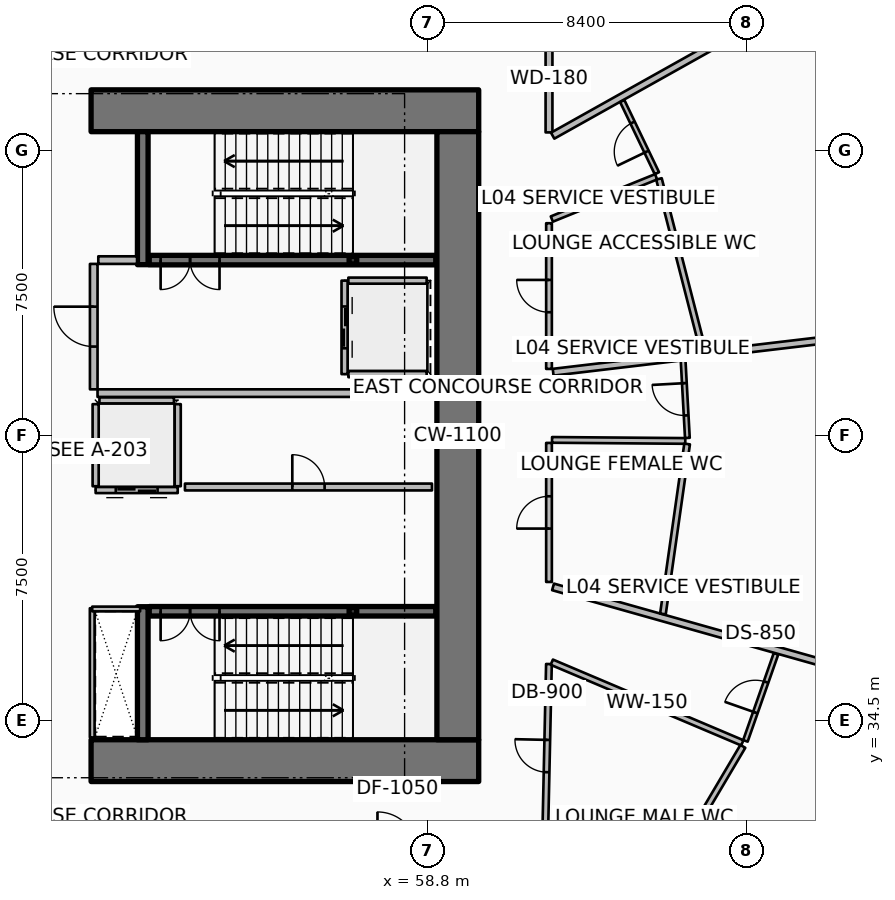
"""IFC4 building model, lengths in metres.
Left out: names, types, materials, properties, quantities, classifications, styles, units other than length and angle.
Written with IfcOpenShell. Run it as: python <this file> out.ifc"""

import sys

from ifc_helpers import new_model, si_unit, direction, frame, frame_2d, origin, origin_2d, place, context, subcontext, project, spatial, rectangle, hollow_rectangle, extrude, element, fill, save


model = new_model("IFC4")
c1 = context("Model", 3, precision=1e-05, world=origin(), true_north=direction((0.0, 1.0)))
c2 = subcontext(c1, "Body", "Model", "MODEL_VIEW")
j1 = project(units=[si_unit("LENGTHUNIT", "METRE"), si_unit("PLANEANGLEUNIT", "RADIAN")], contexts=[c1])
p1 = place(None, origin())
s1 = spatial("IfcSite", under=j1, at=p1, CompositionType="ELEMENT")
p2 = place(p1, origin())
s2 = spatial("IfcBuilding", under=s1, at=p2, CompositionType="ELEMENT")
p3 = place(p2, frame((0.0, 0.0, 21.6)))
s3 = spatial("IfcBuildingStorey", under=s2, at=p3, CompositionType="ELEMENT", Elevation=21.6)
for number, where, z_axis, x_axis in (
    (1, (49.95, 33.45, 0.0), (0.0, 0.0, 1.0), (1.0, 0.0, 0.0)),
    (2, (49.95, 50.55, 0.0), (0.0, 0.0, 1.0), (1.0, 0.0, 0.0)),
):
    element("IfcWall", number, at=place(p3, frame(where, z_axis=z_axis, x_axis=x_axis)), inside=s3, PredefinedType="SHEAR", context=c2, shape_type="SweptSolid", body=[
        extrude(rectangle(XDim=10.2, YDim=1.1, at=frame_2d((5.1, 0.0))), origin(), (0.0, 0.0, 1.0), 4.8),
    ])
p4 = place(p3, frame((59.6, 34.0, 0.0), z_axis=(0.0, 0.0, 1.0), x_axis=(0.0, 1.0, 0.0)))
e3 = element("IfcWall", 3, at=p4, inside=s3, PredefinedType="SHEAR", context=c2, shape_type="SweptSolid", body=[
    extrude(rectangle(XDim=16.0, YDim=1.1, at=frame_2d((8.0, 0.0))), origin(), (0.0, 0.0, 1.0), 4.8),
])
for number, where, z_axis, x_axis in (
    (4, (51.31, 46.5, 0.0), (0.0, 0.0, 1.0), (0.0, 1.0, 0.0)),
    (5, (51.31, 34.0, 0.0), (0.0, 0.0, 1.0), (0.0, 1.0, 0.0)),
):
    element("IfcWall", number, at=place(p3, frame(where, z_axis=z_axis, x_axis=x_axis)), inside=s3, PredefinedType="SHEAR", context=c2, shape_type="SweptSolid", body=[
        extrude(rectangle(XDim=3.5, YDim=0.28, at=frame_2d((1.75, 0.0))), origin(), (0.0, 0.0, 1.0), 4.8),
    ])
for number, where, z_axis, x_axis in (
    (6, (56.84, 46.62, 0.0), (0.0, 0.0, 1.0), (1.0, 0.0, 0.0)),
    (7, (56.84, 37.38, 0.0), (0.0, 0.0, 1.0), (1.0, 0.0, 0.0)),
):
    element("IfcColumn", number, at=place(p3, frame(where, z_axis=z_axis, x_axis=x_axis)), inside=s3, PredefinedType="COLUMN", context=c2, shape_type="SweptSolid", body=[
        extrude(hollow_rectangle(XDim=0.2, YDim=0.2, WallThickness=0.01, InnerFilletRadius=0.01, OuterFilletRadius=0.02, at=origin_2d()), origin(), (0.0, 0.0, 1.0), 2.195),
    ])
p5 = place(p3, frame((51.48, 46.62, 0.0), z_axis=(0.0, 0.0, 1.0), x_axis=(1.0, 0.0, 0.0)))
e8 = element("IfcWall", 8, at=p5, inside=s3, PredefinedType="SOLIDWALL", context=c2, shape_type="SweptSolid", body=[
    extrude(rectangle(XDim=7.54, YDim=0.25, at=frame_2d((3.77, 0.0))), origin(), (0.0, 0.0, 1.0), 4.4),
])
p6 = place(p5, frame((0.3, 0.0, 0.0)))
e9 = element("IfcOpeningElement", 9, at=p6, cuts=e8, PredefinedType="OPENING", context=c2, shape_type="SweptSolid", body=[
    extrude(rectangle(XDim=1.55, YDim=2.15, at=frame_2d((0.775, 1.075))), frame((0.0, 0.135, 0.0), z_axis=(0.0, -1.0, 0.0), x_axis=(1.0, 0.0, 0.0)), (0.0, 0.0, 1.0), 0.27),
])
p7 = place(p3, frame((51.48, 37.38, 0.0), z_axis=(0.0, 0.0, 1.0), x_axis=(1.0, 0.0, 0.0)))
e10 = element("IfcWall", 10, at=p7, inside=s3, PredefinedType="SOLIDWALL", context=c2, shape_type="SweptSolid", body=[
    extrude(rectangle(XDim=7.54, YDim=0.25, at=frame_2d((3.77, 0.0))), origin(), (0.0, 0.0, 1.0), 4.4),
])
p8 = place(p7, frame((0.3, 0.0, 0.0)))
e11 = element("IfcOpeningElement", 11, at=p8, cuts=e10, PredefinedType="OPENING", context=c2, shape_type="SweptSolid", body=[
    extrude(rectangle(XDim=1.55, YDim=2.15, at=frame_2d((0.775, 1.075))), frame((0.0, 0.135, 0.0), z_axis=(0.0, -1.0, 0.0), x_axis=(1.0, 0.0, 0.0)), (0.0, 0.0, 1.0), 0.27),
])
p9 = place(p3, frame((56.62, 46.08, 0.0), z_axis=(0.0, 0.0, 1.0), x_axis=(0.0, -1.0, 0.0)))
e12 = element("IfcWall", 12, at=p9, inside=s3, PredefinedType="PARTITIONING", context=c2, shape_type="SweptSolid", body=[
    extrude(rectangle(XDim=2.46, YDim=0.16, at=frame_2d((1.23, 0.0))), origin(), (0.0, 0.0, 1.0), 4.4),
])
p10 = place(p9, frame((0.68, 0.0, 0.0)))
e13 = element("IfcOpeningElement", 13, at=p10, cuts=e12, PredefinedType="OPENING", context=c2, shape_type="SweptSolid", body=[
    extrude(rectangle(XDim=1.1, YDim=2.1, at=frame_2d((0.55, 1.05))), frame((0.0, 0.09, 0.0), z_axis=(0.0, -1.0, 0.0), x_axis=(1.0, 0.0, 0.0)), (0.0, 0.0, 1.0), 0.18),
])
for number, where, z_axis, x_axis in (
    (14, (56.72, 46.08, 0.0), (0.0, 0.0, 1.0), (1.0, 0.0, 0.0)),
    (15, (56.72, 43.62, 0.0), (0.0, 0.0, 1.0), (1.0, 0.0, 0.0)),
):
    element("IfcWall", number, at=place(p3, frame(where, z_axis=z_axis, x_axis=x_axis)), inside=s3, PredefinedType="PARTITIONING", context=c2, shape_type="SweptSolid", body=[
        extrude(rectangle(XDim=2.06, YDim=0.16, at=frame_2d((1.03, 0.0))), origin(), (0.0, 0.0, 1.0), 4.4),
    ])
p11 = place(p3, frame((52.23, 40.57, 0.0), z_axis=(0.0, 0.0, 1.0), x_axis=(-1.0, 0.0, 0.0)))
e16 = element("IfcWall", 16, at=p11, inside=s3, PredefinedType="PARTITIONING", context=c2, shape_type="SweptSolid", body=[
    extrude(rectangle(XDim=2.16, YDim=0.16, at=frame_2d((1.08, 0.0))), origin(), (0.0, 0.0, 1.0), 4.4),
])
p12 = place(p11, frame((0.53, 0.0, 0.0)))
e17 = element("IfcOpeningElement", 17, at=p12, cuts=e16, PredefinedType="OPENING", context=c2, shape_type="SweptSolid", body=[
    extrude(rectangle(XDim=1.1, YDim=2.1, at=frame_2d((0.55, 1.05))), frame((0.0, 0.09, 0.0), z_axis=(0.0, -1.0, 0.0), x_axis=(1.0, 0.0, 0.0)), (0.0, 0.0, 1.0), 0.18),
])
for number, where, z_axis, x_axis in (
    (18, (52.23, 40.67, 0.0), (0.0, 0.0, 1.0), (0.0, 1.0, 0.0)),
    (19, (50.07, 40.67, 0.0), (0.0, 0.0, 1.0), (0.0, 1.0, 0.0)),
):
    element("IfcWall", number, at=place(p3, frame(where, z_axis=z_axis, x_axis=x_axis)), inside=s3, PredefinedType="PARTITIONING", context=c2, shape_type="SweptSolid", body=[
        extrude(rectangle(XDim=2.16, YDim=0.16, at=frame_2d((1.08, 0.0))), origin(), (0.0, 0.0, 1.0), 4.4),
    ])
p13 = place(p3, frame((50.17, 42.93, 0.0), z_axis=(0.0, 0.0, 1.0), x_axis=(1.0, 0.0, 0.0)))
e20 = element("IfcWall", 20, at=p13, inside=s3, PredefinedType="PARTITIONING", context=c2, shape_type="SweptSolid", body=[
    extrude(rectangle(XDim=1.96, YDim=0.16, at=frame_2d((0.98, 0.0))), origin(), (0.0, 0.0, 1.0), 4.4),
])
p14 = place(p3, frame((52.42, 40.65, 0.0), z_axis=(0.0, 0.0, 1.0), x_axis=(1.0, 0.0, 0.0)))
e21 = element("IfcWall", 21, at=p14, inside=s3, PredefinedType="PARTITIONING", context=c2, shape_type="SweptSolid", body=[
    extrude(rectangle(XDim=6.5, YDim=0.18, at=frame_2d((3.25, 0.0))), origin(), (0.0, 0.0, 1.0), 4.4),
])
p15 = place(p14, frame((2.825, 0.0, 0.0)))
e22 = element("IfcOpeningElement", 22, at=p15, cuts=e21, PredefinedType="OPENING", context=c2, shape_type="SweptSolid", body=[
    extrude(rectangle(XDim=0.85, YDim=2.06, at=frame_2d((0.425, 1.03))), frame((0.0, 0.1, 0.0), z_axis=(0.0, -1.0, 0.0), x_axis=(1.0, 0.0, 0.0)), (0.0, 0.0, 1.0), 0.2),
])
p16 = place(p3, frame((50.12, 43.12, 0.0), z_axis=(0.0, 0.0, 1.0), x_axis=(1.0, 0.0, 0.0)))
e23 = element("IfcWall", 23, at=p16, inside=s3, PredefinedType="PARTITIONING", context=c2, shape_type="SweptSolid", body=[
    extrude(rectangle(XDim=8.88, YDim=0.2, at=frame_2d((4.44, 0.0))), origin(), (0.0, 0.0, 1.0), 4.4),
])
p17 = place(p3, frame((50.14, 46.62, 0.0), z_axis=(0.0, 0.0, 1.0), x_axis=(1.0, 0.0, 0.0)))
e24 = element("IfcWall", 24, at=p17, inside=s3, PredefinedType="PARTITIONING", context=c2, shape_type="SweptSolid", body=[
    extrude(rectangle(XDim=1.02, YDim=0.2, at=frame_2d((0.51, 0.0))), origin(), (0.0, 0.0, 1.0), 4.4),
])
p18 = place(p3, frame((50.02, 43.22, 0.0), z_axis=(0.0, 0.0, 1.0), x_axis=(0.0, 1.0, 0.0)))
e25 = element("IfcWall", 25, at=p18, inside=s3, PredefinedType="PARTITIONING", context=c2, shape_type="SweptSolid", body=[
    extrude(rectangle(XDim=3.3, YDim=0.2, at=frame_2d((1.65, 0.0))), origin(), (0.0, 0.0, 1.0), 4.4),
])
p19 = place(p18, frame((1.125, 0.0, 0.0)))
e26 = element("IfcOpeningElement", 26, at=p19, cuts=e25, PredefinedType="OPENING", context=c2, shape_type="SweptSolid", body=[
    extrude(rectangle(XDim=1.05, YDim=2.1, at=frame_2d((0.525, 1.05))), frame((0.0, 0.11, 0.0), z_axis=(0.0, -1.0, 0.0), x_axis=(1.0, 0.0, 0.0)), (0.0, 0.0, 1.0), 0.22),
])
p20 = place(p3, frame((49.98, 34.06, 0.0), z_axis=(0.0, 0.0, 1.0), x_axis=(0.0, 1.0, 0.0)))
e27 = element("IfcWall", 27, at=p20, inside=s3, PredefinedType="PARTITIONING", context=c2, shape_type="SweptSolid", body=[
    extrude(rectangle(XDim=3.4, YDim=0.125, at=frame_2d((1.7, 0.0))), origin(), (0.0, 0.0, 1.0), 3.84),
])
p21 = place(p3, frame((49.98, 37.44, 0.0), z_axis=(0.0, 0.0, 1.0), x_axis=(1.0, 0.0, 0.0)))
e28 = element("IfcWall", 28, at=p21, inside=s3, PredefinedType="PARTITIONING", context=c2, shape_type="SweptSolid", body=[
    extrude(rectangle(XDim=1.26, YDim=0.125, at=frame_2d((0.63, 0.0))), origin(), (0.0, 0.0, 1.0), 3.84),
])
p22 = place(p3, frame((62.0, 49.98, 0.0), z_axis=(0.0, 0.0, 1.0), x_axis=(0.0, 1.0, 0.0)))
e29 = element("IfcWall", 29, at=p22, inside=s3, PredefinedType="PARTITIONING", context=c2, shape_type="SweptSolid", body=[
    extrude(rectangle(XDim=2.83, YDim=0.18, at=frame_2d((1.415, 0.0))), origin(), (0.0, 0.0, 1.0), 3.357),
])
p23 = place(p3, frame((62.096, 49.894, 0.0), z_axis=(0.0, 0.0, 1.0), x_axis=(0.872490608205, 0.488630881744, 0.0)))
e30 = element("IfcWall", 30, at=p23, inside=s3, PredefinedType="PARTITIONING", context=c2, shape_type="SweptSolid", body=[
    extrude(rectangle(XDim=19.185, YDim=0.18, at=frame_2d((9.592, 0.0))), origin(), (0.0, 0.0, 1.0), 3.357),
])
p24 = place(p3, frame((61.892, 31.15, 0.0), z_axis=(0.0, 0.0, 1.0), x_axis=(0.021928973177, 0.999759531155, 0.0)))
e31 = element("IfcWall", 31, at=p24, inside=s3, PredefinedType="PARTITIONING", context=c2, shape_type="SweptSolid", body=[
    extrude(rectangle(XDim=4.843, YDim=0.15, at=frame_2d((2.421, 0.0))), origin(), (0.0, 0.0, 1.0), 3.357),
])
p25 = place(p24, frame((1.997, 0.0, 0.0)))
e32 = element("IfcOpeningElement", 32, at=p25, cuts=e31, PredefinedType="OPENING", context=c2, shape_type="SweptSolid", body=[
    extrude(rectangle(XDim=0.85, YDim=2.06, at=frame_2d((0.425, 1.03))), frame((0.0, 0.085, 0.0), z_axis=(0.0, -1.0, 0.0), x_axis=(1.0, 0.0, 0.0)), (0.0, 0.0, 1.0), 0.17),
])
p26 = place(p3, frame((62.074, 36.041, 0.0), z_axis=(0.0, 0.0, 1.0), x_axis=(0.920841540816, -0.38993699069, 0.0)))
e33 = element("IfcWall", 33, at=p26, inside=s3, PredefinedType="PARTITIONING", context=c2, shape_type="SweptSolid", body=[
    extrude(rectangle(XDim=5.443, YDim=0.15, at=frame_2d((2.722, 0.0))), origin(), (0.0, 0.0, 1.0), 3.84),
])
p27 = place(p3, frame((64.375, 29.217, 0.0), z_axis=(0.0, 0.0, 1.0), x_axis=(0.509047270842, 0.860738564286, 0.0)))
e34 = element("IfcWall", 34, at=p27, inside=s3, PredefinedType="PARTITIONING", context=c2, shape_type="SweptSolid", body=[
    extrude(rectangle(XDim=5.354, YDim=0.15, at=frame_2d((2.677, 0.0))), origin(), (0.0, 0.0, 1.0), 3.357),
])
p28 = place(p3, frame((67.168, 33.97, 0.0), z_axis=(0.0, 0.0, 1.0), x_axis=(0.331316814656, 0.943519564358, 0.0)))
e35 = element("IfcWall", 35, at=p28, inside=s3, PredefinedType="PARTITIONING", context=c2, shape_type="SweptSolid", body=[
    extrude(rectangle(XDim=2.43, YDim=0.125, at=frame_2d((1.215, 0.0))), origin(), (0.0, 0.0, 1.0), 3.357),
])
p29 = place(p28, frame((0.79, 0.0, 0.0)))
e36 = element("IfcOpeningElement", 36, at=p29, cuts=e35, PredefinedType="OPENING", context=c2, shape_type="SweptSolid", body=[
    extrude(rectangle(XDim=0.85, YDim=2.06, at=frame_2d((0.425, 1.03))), frame((0.0, 0.073, 0.0), z_axis=(0.0, -1.0, 0.0), x_axis=(1.0, 0.0, 0.0)), (0.0, 0.0, 1.0), 0.145),
])
p30 = place(p3, frame((62.106, 38.022, 0.0), z_axis=(0.0, 0.0, 1.0), x_axis=(0.962455233657, -0.271440459782, 0.0)))
e37 = element("IfcWall", 37, at=p30, inside=s3, PredefinedType="PARTITIONING", context=c2, shape_type="SweptSolid", body=[
    extrude(rectangle(XDim=19.716, YDim=0.18, at=frame_2d((9.858, 0.0))), origin(), (0.0, 0.0, 1.0), 3.357),
])
p31 = place(p3, frame((62.0, 38.152, 0.0), z_axis=(0.0, 0.0, 1.0), x_axis=(0.0, 1.0, 0.0)))
e38 = element("IfcWall", 38, at=p31, inside=s3, PredefinedType="PARTITIONING", context=c2, shape_type="SweptSolid", body=[
    extrude(rectangle(XDim=3.658, YDim=0.15, at=frame_2d((1.829, 0.0))), origin(), (0.0, 0.0, 1.0), 3.357),
])
p32 = place(p31, frame((1.404, 0.0, 0.0)))
e39 = element("IfcOpeningElement", 39, at=p32, cuts=e38, PredefinedType="OPENING", context=c2, shape_type="SweptSolid", body=[
    extrude(rectangle(XDim=0.85, YDim=2.06, at=frame_2d((0.425, 1.03))), frame((0.0, 0.085, 0.0), z_axis=(0.0, -1.0, 0.0), x_axis=(1.0, 0.0, 0.0)), (0.0, 0.0, 1.0), 0.17),
])
p33 = place(p3, frame((62.08, 41.889, 0.0), z_axis=(0.0, 0.0, 1.0), x_axis=(0.999969031596, -0.007869933178, 0.0)))
e40 = element("IfcWall", 40, at=p33, inside=s3, PredefinedType="PARTITIONING", context=c2, shape_type="SweptSolid", body=[
    extrude(rectangle(XDim=3.505, YDim=0.15, at=frame_2d((1.753, 0.0))), origin(), (0.0, 0.0, 1.0), 3.84),
])
p34 = place(p3, frame((64.998, 37.309, 0.0), z_axis=(0.0, 0.0, 1.0), x_axis=(0.140922059176, 0.990020693338, 0.0)))
e41 = element("IfcWall", 41, at=p34, inside=s3, PredefinedType="PARTITIONING", context=c2, shape_type="SweptSolid", body=[
    extrude(rectangle(XDim=4.518, YDim=0.15, at=frame_2d((2.259, 0.0))), origin(), (0.0, 0.0, 1.0), 3.357),
])
p35 = place(p3, frame((65.641, 41.941, 0.0), z_axis=(0.0, 0.0, 1.0), x_axis=(-0.054918793983, 0.998490824228, 0.0)))
e42 = element("IfcWall", 42, at=p35, inside=s3, PredefinedType="PARTITIONING", context=c2, shape_type="SweptSolid", body=[
    extrude(rectangle(XDim=2.036, YDim=0.125, at=frame_2d((1.018, 0.0))), origin(), (0.0, 0.0, 1.0), 3.357),
])
p36 = place(p35, frame((0.593, 0.0, 0.0)))
e43 = element("IfcOpeningElement", 43, at=p36, cuts=e42, PredefinedType="OPENING", context=c2, shape_type="SweptSolid", body=[
    extrude(rectangle(XDim=0.85, YDim=2.06, at=frame_2d((0.425, 1.03))), frame((0.0, 0.073, 0.0), z_axis=(0.0, -1.0, 0.0), x_axis=(1.0, 0.0, 0.0)), (0.0, 0.0, 1.0), 0.145),
])
p37 = place(p3, frame((62.109, 43.67, 0.0), z_axis=(0.0, 0.0, 1.0), x_axis=(0.993068665713, 0.117535633659, 0.0)))
e44 = element("IfcWall", 44, at=p37, inside=s3, PredefinedType="PARTITIONING", context=c2, shape_type="SweptSolid", body=[
    extrude(rectangle(XDim=21.133, YDim=0.18, at=frame_2d((10.566, 0.0))), origin(), (0.0, 0.0, 1.0), 3.357),
])
p38 = place(p3, frame((62.0, 43.757, 0.0), z_axis=(0.0, 0.0, 1.0), x_axis=(0.0, 1.0, 0.0)))
e45 = element("IfcWall", 45, at=p38, inside=s3, PredefinedType="PARTITIONING", context=c2, shape_type="SweptSolid", body=[
    extrude(rectangle(XDim=3.833, YDim=0.15, at=frame_2d((1.917, 0.0))), origin(), (0.0, 0.0, 1.0), 3.357),
])
p39 = place(p38, frame((1.492, 0.0, 0.0)))
e46 = element("IfcOpeningElement", 46, at=p39, cuts=e45, PredefinedType="OPENING", context=c2, shape_type="SweptSolid", body=[
    extrude(rectangle(XDim=0.85, YDim=2.06, at=frame_2d((0.425, 1.03))), frame((0.0, 0.085, 0.0), z_axis=(0.0, -1.0, 0.0), x_axis=(1.0, 0.0, 0.0)), (0.0, 0.0, 1.0), 0.17),
])
p40 = place(p3, frame((62.074, 47.701, 0.0), z_axis=(0.0, 0.0, 1.0), x_axis=(0.926852538468, 0.375425587747, 0.0)))
e47 = element("IfcWall", 47, at=p40, inside=s3, PredefinedType="PARTITIONING", context=c2, shape_type="SweptSolid", body=[
    extrude(rectangle(XDim=2.96, YDim=0.15, at=frame_2d((1.48, 0.0))), origin(), (0.0, 0.0, 1.0), 3.84),
])
p41 = place(p3, frame((66.054, 44.237, 0.0), z_axis=(0.0, 0.0, 1.0), x_axis=(-0.248710144761, 0.968577959636, 0.0)))
e48 = element("IfcWall", 48, at=p41, inside=s3, PredefinedType="PARTITIONING", context=c2, shape_type="SweptSolid", body=[
    extrude(rectangle(XDim=4.667, YDim=0.15, at=frame_2d((2.333, 0.0))), origin(), (0.0, 0.0, 1.0), 3.357),
])
p42 = place(p3, frame((64.839, 48.906, 0.0), z_axis=(0.0, 0.0, 1.0), x_axis=(-0.432923235959, 0.901430791446, 0.0)))
e49 = element("IfcWall", 49, at=p42, inside=s3, PredefinedType="PARTITIONING", context=c2, shape_type="SweptSolid", body=[
    extrude(rectangle(XDim=2.106, YDim=0.125, at=frame_2d((1.053, 0.0))), origin(), (0.0, 0.0, 1.0), 3.357),
])
p43 = place(p42, frame((0.628, 0.0, 0.0)))
e50 = element("IfcOpeningElement", 50, at=p43, cuts=e49, PredefinedType="OPENING", context=c2, shape_type="SweptSolid", body=[
    extrude(rectangle(XDim=0.85, YDim=2.06, at=frame_2d((0.425, 1.03))), frame((0.0, 0.073, 0.0), z_axis=(0.0, -1.0, 0.0), x_axis=(1.0, 0.0, 0.0)), (0.0, 0.0, 1.0), 0.145),
])
p44 = place(p6, origin())
e51 = element("IfcDoor", 51, at=p44, inside=s3, OperationType="DOUBLE_DOOR_SINGLE_SWING", PredefinedType="DOOR", context=c2, shape_type="SweptSolid", body=[
    extrude(rectangle(XDim=1.55, YDim=2.15, at=frame_2d((0.775, 1.075))), frame((0.0, 0.025, 0.0), z_axis=(0.0, -1.0, 0.0), x_axis=(1.0, 0.0, 0.0)), (0.0, 0.0, 1.0), 0.05),
])
fill(e9, e51)
p45 = place(p8, origin())
e52 = element("IfcDoor", 52, at=p45, inside=s3, OperationType="DOUBLE_DOOR_SINGLE_SWING", PredefinedType="DOOR", context=c2, shape_type="SweptSolid", body=[
    extrude(rectangle(XDim=1.55, YDim=2.15, at=frame_2d((0.775, 1.075))), frame((0.0, 0.025, 0.0), z_axis=(0.0, -1.0, 0.0), x_axis=(1.0, 0.0, 0.0)), (0.0, 0.0, 1.0), 0.05),
])
fill(e11, e52)
p46 = place(p10, origin())
e53 = element("IfcDoor", 53, at=p46, inside=s3, OperationType="DOUBLE_DOOR_SLIDING", PredefinedType="DOOR", context=c2, shape_type="SweptSolid", body=[
    extrude(rectangle(XDim=1.1, YDim=2.1, at=frame_2d((0.55, 1.05))), frame((0.0, 0.025, 0.0), z_axis=(0.0, -1.0, 0.0), x_axis=(1.0, 0.0, 0.0)), (0.0, 0.0, 1.0), 0.05),
])
fill(e13, e53)
p47 = place(p12, origin())
e54 = element("IfcDoor", 54, at=p47, inside=s3, OperationType="DOUBLE_DOOR_SLIDING", PredefinedType="DOOR", context=c2, shape_type="SweptSolid", body=[
    extrude(rectangle(XDim=1.1, YDim=2.1, at=frame_2d((0.55, 1.05))), frame((0.0, 0.025, 0.0), z_axis=(0.0, -1.0, 0.0), x_axis=(1.0, 0.0, 0.0)), (0.0, 0.0, 1.0), 0.05),
])
fill(e17, e54)
p48 = place(p15, origin())
e55 = element("IfcDoor", 55, at=p48, inside=s3, OperationType="SINGLE_SWING_LEFT", PredefinedType="DOOR", context=c2, shape_type="SweptSolid", body=[
    extrude(rectangle(XDim=0.85, YDim=2.06, at=frame_2d((0.425, 1.03))), frame((0.0, 0.025, 0.0), z_axis=(0.0, -1.0, 0.0), x_axis=(1.0, 0.0, 0.0)), (0.0, 0.0, 1.0), 0.05),
])
fill(e22, e55)
p49 = place(p19, origin())
e56 = element("IfcDoor", 56, at=p49, inside=s3, OperationType="SINGLE_SWING_RIGHT", PredefinedType="DOOR", context=c2, shape_type="SweptSolid", body=[
    extrude(rectangle(XDim=1.05, YDim=2.1, at=frame_2d((0.525, 1.05))), frame((0.0, 0.025, 0.0), z_axis=(0.0, -1.0, 0.0), x_axis=(1.0, 0.0, 0.0)), (0.0, 0.0, 1.0), 0.05),
])
fill(e26, e56)
p50 = place(p25, origin())
e57 = element("IfcDoor", 57, at=p50, inside=s3, OperationType="SINGLE_SWING_RIGHT", PredefinedType="DOOR", context=c2, shape_type="SweptSolid", body=[
    extrude(rectangle(XDim=0.85, YDim=2.06, at=frame_2d((0.425, 1.03))), frame((0.0, 0.025, 0.0), z_axis=(0.0, -1.0, 0.0), x_axis=(1.0, 0.0, 0.0)), (0.0, 0.0, 1.0), 0.05),
])
fill(e32, e57)
p51 = place(p29, origin())
e58 = element("IfcDoor", 58, at=p51, inside=s3, OperationType="SINGLE_SWING_LEFT", PredefinedType="DOOR", context=c2, shape_type="SweptSolid", body=[
    extrude(rectangle(XDim=0.85, YDim=2.06, at=frame_2d((0.425, 1.03))), frame((0.0, 0.025, 0.0), z_axis=(0.0, -1.0, 0.0), x_axis=(1.0, 0.0, 0.0)), (0.0, 0.0, 1.0), 0.05),
])
fill(e36, e58)
p52 = place(p32, origin())
e59 = element("IfcDoor", 59, at=p52, inside=s3, OperationType="SINGLE_SWING_LEFT", PredefinedType="DOOR", context=c2, shape_type="SweptSolid", body=[
    extrude(rectangle(XDim=0.85, YDim=2.06, at=frame_2d((0.425, 1.03))), frame((0.0, 0.025, 0.0), z_axis=(0.0, -1.0, 0.0), x_axis=(1.0, 0.0, 0.0)), (0.0, 0.0, 1.0), 0.05),
])
fill(e39, e59)
p53 = place(p36, origin())
e60 = element("IfcDoor", 60, at=p53, inside=s3, OperationType="SINGLE_SWING_RIGHT", PredefinedType="DOOR", context=c2, shape_type="SweptSolid", body=[
    extrude(rectangle(XDim=0.85, YDim=2.06, at=frame_2d((0.425, 1.03))), frame((0.0, 0.025, 0.0), z_axis=(0.0, -1.0, 0.0), x_axis=(1.0, 0.0, 0.0)), (0.0, 0.0, 1.0), 0.05),
])
fill(e43, e60)
p54 = place(p39, origin())
e61 = element("IfcDoor", 61, at=p54, inside=s3, OperationType="SINGLE_SWING_RIGHT", PredefinedType="DOOR", context=c2, shape_type="SweptSolid", body=[
    extrude(rectangle(XDim=0.85, YDim=2.06, at=frame_2d((0.425, 1.03))), frame((0.0, 0.025, 0.0), z_axis=(0.0, -1.0, 0.0), x_axis=(1.0, 0.0, 0.0)), (0.0, 0.0, 1.0), 0.05),
])
fill(e46, e61)
p55 = place(p43, origin())
e62 = element("IfcDoor", 62, at=p55, inside=s3, OperationType="SINGLE_SWING_LEFT", PredefinedType="DOOR", context=c2, shape_type="SweptSolid", body=[
    extrude(rectangle(XDim=0.85, YDim=2.06, at=frame_2d((0.425, 1.03))), frame((0.0, 0.025, 0.0), z_axis=(0.0, -1.0, 0.0), x_axis=(1.0, 0.0, 0.0)), (0.0, 0.0, 1.0), 0.05),
])
fill(e50, e62)
save(model, sys.argv[1])
